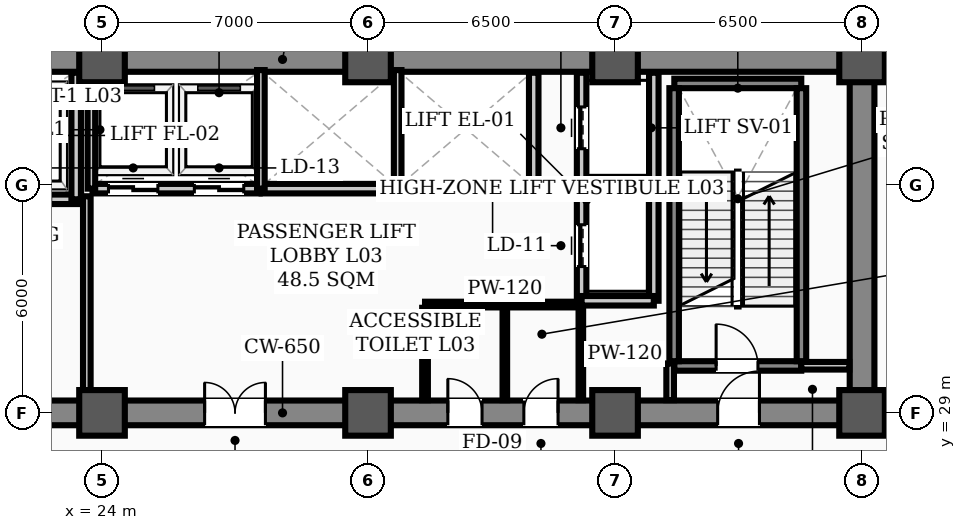
"""IFC4 building model, lengths in metres.
Left out: names, types, materials, properties, quantities, classifications, styles, units other than length and angle.
Written with IfcOpenShell. Run it as: python <this file> out.ifc"""

import sys

from ifc_helpers import new_model, si_unit, direction, frame, frame_2d, origin, origin_2d, place, context, subcontext, project, spatial, rectangle, hollow_rectangle, extrude, element, fill, save


model = new_model("IFC4")
c1 = context("Model", 3, precision=1e-05, world=origin(), true_north=direction((0.0, 1.0)))
c2 = subcontext(c1, "Body", "Model", "MODEL_VIEW")
j1 = project(units=[si_unit("LENGTHUNIT", "METRE"), si_unit("PLANEANGLEUNIT", "RADIAN")], contexts=[c1])
p1 = place(None, origin())
s1 = spatial("IfcSite", under=j1, at=p1, CompositionType="ELEMENT")
p2 = place(p1, origin())
s2 = spatial("IfcBuilding", under=s1, at=p2, CompositionType="ELEMENT")
p3 = place(p2, frame((0.0, 0.0, 11.2)))
s3 = spatial("IfcBuildingStorey", under=s2, at=p3, CompositionType="ELEMENT", Elevation=11.2)
for number, where, z_axis, x_axis in (
    (1, (24.0, 29.0, 0.0), (0.0, 0.0, 1.0), (1.0, 0.0, 0.0)),
    (2, (24.0, 38.3, 0.0), (0.0, 0.0, 1.0), (1.0, 0.0, 0.0)),
    (3, (31.0, 29.0, 0.0), (0.0, 0.0, 1.0), (1.0, 0.0, 0.0)),
    (4, (31.0, 38.3, 0.0), (0.0, 0.0, 1.0), (1.0, 0.0, 0.0)),
    (5, (37.5, 29.0, 0.0), (0.0, 0.0, 1.0), (1.0, 0.0, 0.0)),
    (6, (37.5, 38.3, 0.0), (0.0, 0.0, 1.0), (1.0, 0.0, 0.0)),
    (7, (44.0, 29.0, 0.0), (0.0, 0.0, 1.0), (1.0, 0.0, 0.0)),
    (8, (44.0, 38.3, 0.0), (0.0, 0.0, 1.0), (1.0, 0.0, 0.0)),
):
    element("IfcColumn", number, at=place(p3, frame(where, z_axis=z_axis, x_axis=x_axis)), inside=s3, PredefinedType="COLUMN", context=c2, shape_type="SweptSolid", body=[
        extrude(hollow_rectangle(XDim=1.2, YDim=1.2, WallThickness=0.04, InnerFilletRadius=0.02, OuterFilletRadius=0.06, at=origin_2d()), origin(), (0.0, 0.0, 1.0), 5.4),
    ])
p4 = place(p3, frame((13.5, 29.0, 0.0), z_axis=(0.0, 0.0, 1.0), x_axis=(1.0, 0.0, 0.0)))
e9 = element("IfcWall", 9, at=p4, inside=s3, PredefinedType="SHEAR", context=c2, shape_type="SweptSolid", body=[
    extrude(rectangle(XDim=30.5, YDim=0.65, at=frame_2d((15.25, 0.0))), origin(), (0.0, 0.0, 1.0), 5.15),
])
p5 = place(p4, frame((1.75, 0.0, 0.0)))
e10 = element("IfcOpeningElement", 10, at=p5, cuts=e9, PredefinedType="OPENING", context=c2, shape_type="SweptSolid", body=[
    extrude(rectangle(XDim=1.1, YDim=2.08, at=frame_2d((0.55, 1.04))), frame((0.0, 0.335, 0.0), z_axis=(0.0, -1.0, 0.0), x_axis=(1.0, 0.0, 0.0)), (0.0, 0.0, 1.0), 0.67),
])
p6 = place(p4, frame((26.7, 0.0, 0.0)))
e11 = element("IfcOpeningElement", 11, at=p6, cuts=e9, PredefinedType="OPENING", context=c2, shape_type="SweptSolid", body=[
    extrude(rectangle(XDim=1.1, YDim=2.08, at=frame_2d((0.55, 1.04))), frame((0.0, 0.335, 0.0), z_axis=(0.0, -1.0, 0.0), x_axis=(1.0, 0.0, 0.0)), (0.0, 0.0, 1.0), 0.67),
])
p7 = place(p4, frame((6.8, 0.0, 0.0)))
e12 = element("IfcOpeningElement", 12, at=p7, cuts=e9, PredefinedType="OPENING", context=c2, shape_type="SweptSolid", body=[
    extrude(rectangle(XDim=1.1, YDim=2.08, at=frame_2d((0.55, 1.04))), frame((0.0, 0.335, 0.0), z_axis=(0.0, -1.0, 0.0), x_axis=(1.0, 0.0, 0.0)), (0.0, 0.0, 1.0), 0.67),
])
p8 = place(p4, frame((13.2, 0.0, 0.0)))
e13 = element("IfcOpeningElement", 13, at=p8, cuts=e9, PredefinedType="OPENING", context=c2, shape_type="SweptSolid", body=[
    extrude(rectangle(XDim=1.6, YDim=2.08, at=frame_2d((0.8, 1.04))), frame((0.0, 0.335, 0.0), z_axis=(0.0, -1.0, 0.0), x_axis=(1.0, 0.0, 0.0)), (0.0, 0.0, 1.0), 0.67),
])
p9 = place(p4, frame((19.6, 0.0, 0.0)))
e14 = element("IfcOpeningElement", 14, at=p9, cuts=e9, PredefinedType="OPENING", context=c2, shape_type="SweptSolid", body=[
    extrude(rectangle(XDim=0.9, YDim=2.08, at=frame_2d((0.45, 1.04))), frame((0.0, 0.335, 0.0), z_axis=(0.0, -1.0, 0.0), x_axis=(1.0, 0.0, 0.0)), (0.0, 0.0, 1.0), 0.67),
])
p10 = place(p4, frame((21.6, 0.0, 0.0)))
e15 = element("IfcOpeningElement", 15, at=p10, cuts=e9, PredefinedType="OPENING", context=c2, shape_type="SweptSolid", body=[
    extrude(rectangle(XDim=0.9, YDim=2.08, at=frame_2d((0.45, 1.04))), frame((0.0, 0.335, 0.0), z_axis=(0.0, -1.0, 0.0), x_axis=(1.0, 0.0, 0.0)), (0.0, 0.0, 1.0), 0.67),
])
p11 = place(p3, frame((13.5, 38.3, 0.0), z_axis=(0.0, 0.0, 1.0), x_axis=(1.0, 0.0, 0.0)))
e16 = element("IfcWall", 16, at=p11, inside=s3, PredefinedType="SHEAR", context=c2, shape_type="SweptSolid", body=[
    extrude(rectangle(XDim=30.5, YDim=0.65, at=frame_2d((15.25, 0.0))), origin(), (0.0, 0.0, 1.0), 5.15),
])
p12 = place(p3, frame((44.0, 29.35, 0.0), z_axis=(0.0, 0.0, 1.0), x_axis=(0.0, 1.0, 0.0)))
e17 = element("IfcWall", 17, at=p12, inside=s3, PredefinedType="SHEAR", context=c2, shape_type="SweptSolid", body=[
    extrude(rectangle(XDim=8.6, YDim=0.65, at=frame_2d((4.3, 0.0))), origin(), (0.0, 0.0, 1.0), 5.15),
])
p13 = place(p3, frame((39.06, 30.235, 0.0), z_axis=(0.0, 0.0, 1.0), x_axis=(1.0, 0.0, 0.0)))
e18 = element("IfcWall", 18, at=p13, inside=s3, PredefinedType="STANDARD", context=c2, shape_type="SweptSolid", body=[
    extrude(rectangle(XDim=3.34, YDim=0.25, at=frame_2d((1.67, 0.0))), origin(), (0.0, 0.0, 1.0), 5.15),
])
p14 = place(p13, frame((1.1, 0.0, 0.0)))
e19 = element("IfcOpeningElement", 19, at=p14, cuts=e18, PredefinedType="OPENING", context=c2, shape_type="SweptSolid", body=[
    extrude(rectangle(XDim=1.1, YDim=2.08, at=frame_2d((0.55, 1.04))), frame((0.0, 0.135, 0.0), z_axis=(0.0, -1.0, 0.0), x_axis=(1.0, 0.0, 0.0)), (0.0, 0.0, 1.0), 0.27),
])
p15 = place(p3, frame((39.06, 37.669, 0.0), z_axis=(0.0, 0.0, 1.0), x_axis=(1.0, 0.0, 0.0)))
e20 = element("IfcWall", 20, at=p15, inside=s3, PredefinedType="STANDARD", context=c2, shape_type="SweptSolid", body=[
    extrude(rectangle(XDim=3.34, YDim=0.25, at=frame_2d((1.67, 0.0))), origin(), (0.0, 0.0, 1.0), 5.15),
])
for number, where, z_axis, x_axis in (
    (21, (39.055, 30.36, 0.0), (0.0, 0.0, 1.0), (0.0, 1.0, 0.0)),
    (22, (42.405, 30.36, 0.0), (0.0, 0.0, 1.0), (0.0, 1.0, 0.0)),
):
    element("IfcWall", number, at=place(p3, frame(where, z_axis=z_axis, x_axis=x_axis)), inside=s3, PredefinedType="STANDARD", context=c2, shape_type="SweptSolid", body=[
        extrude(rectangle(XDim=7.184, YDim=0.25, at=frame_2d((3.592, 0.0))), origin(), (0.0, 0.0, 1.0), 5.15),
    ])
p16 = place(p3, frame((18.1, 34.62, 0.0), z_axis=(0.0, 0.0, 1.0), x_axis=(1.0, 0.0, 0.0)))
e23 = element("IfcWall", 23, at=p16, inside=s3, PredefinedType="STANDARD", context=c2, shape_type="SweptSolid", body=[
    extrude(rectangle(XDim=5.35, YDim=0.25, at=frame_2d((2.675, 0.0))), origin(), (0.0, 0.0, 1.0), 5.15),
])
p17 = place(p16, frame((0.85, 0.0, 0.0)))
e24 = element("IfcOpeningElement", 24, at=p17, cuts=e23, PredefinedType="OPENING", context=c2, shape_type="SweptSolid", body=[
    extrude(rectangle(XDim=1.1, YDim=2.08, at=frame_2d((0.55, 1.04))), frame((0.0, 0.135, 0.0), z_axis=(0.0, -1.0, 0.0), x_axis=(1.0, 0.0, 0.0)), (0.0, 0.0, 1.0), 0.27),
])
p18 = place(p16, frame((3.45, 0.0, 0.0)))
e25 = element("IfcOpeningElement", 25, at=p18, cuts=e23, PredefinedType="OPENING", context=c2, shape_type="SweptSolid", body=[
    extrude(rectangle(XDim=1.1, YDim=2.08, at=frame_2d((0.55, 1.04))), frame((0.0, 0.135, 0.0), z_axis=(0.0, -1.0, 0.0), x_axis=(1.0, 0.0, 0.0)), (0.0, 0.0, 1.0), 0.27),
])
p19 = place(p3, frame((36.62, 31.95, 0.0), z_axis=(0.0, 0.0, 1.0), x_axis=(0.0, 1.0, 0.0)))
e26 = element("IfcWall", 26, at=p19, inside=s3, PredefinedType="STANDARD", context=c2, shape_type="SweptSolid", body=[
    extrude(rectangle(XDim=6.0, YDim=0.25, at=frame_2d((3.0, 0.0))), origin(), (0.0, 0.0, 1.0), 4.33),
])
p20 = place(p19, frame((0.9, 0.0, 0.0)))
e27 = element("IfcOpeningElement", 27, at=p20, cuts=e26, PredefinedType="OPENING", context=c2, shape_type="SweptSolid", body=[
    extrude(rectangle(XDim=1.1, YDim=2.08, at=frame_2d((0.55, 1.04))), frame((0.0, 0.135, 0.0), z_axis=(0.0, -1.0, 0.0), x_axis=(1.0, 0.0, 0.0)), (0.0, 0.0, 1.0), 0.27),
])
p21 = place(p19, frame((4.0, 0.0, 0.0)))
e28 = element("IfcOpeningElement", 28, at=p21, cuts=e26, PredefinedType="OPENING", context=c2, shape_type="SweptSolid", body=[
    extrude(rectangle(XDim=1.1, YDim=2.08, at=frame_2d((0.55, 1.04))), frame((0.0, 0.135, 0.0), z_axis=(0.0, -1.0, 0.0), x_axis=(1.0, 0.0, 0.0)), (0.0, 0.0, 1.0), 0.27),
])
p22 = place(p3, frame((38.52, 31.95, 0.0), z_axis=(0.0, 0.0, 1.0), x_axis=(0.0, 1.0, 0.0)))
e29 = element("IfcWall", 29, at=p22, inside=s3, PredefinedType="STANDARD", context=c2, shape_type="SweptSolid", body=[
    extrude(rectangle(XDim=6.0, YDim=0.25, at=frame_2d((3.0, 0.0))), origin(), (0.0, 0.0, 1.0), 4.33),
])
p23 = place(p3, frame((36.62, 31.95, 0.0), z_axis=(0.0, 0.0, 1.0), x_axis=(1.0, 0.0, 0.0)))
e30 = element("IfcWall", 30, at=p23, inside=s3, PredefinedType="STANDARD", context=c2, shape_type="SweptSolid", body=[
    extrude(rectangle(XDim=1.9, YDim=0.25, at=frame_2d((0.95, 0.0))), origin(), (0.0, 0.0, 1.0), 4.98),
])
p24 = place(p3, frame((23.32, 34.62, 0.0), z_axis=(0.0, 0.0, 1.0), x_axis=(0.0, 1.0, 0.0)))
e31 = element("IfcWall", 31, at=p24, inside=s3, PredefinedType="STANDARD", context=c2, shape_type="SweptSolid", body=[
    extrude(rectangle(XDim=3.33, YDim=0.25, at=frame_2d((1.665, 0.0))), origin(), (0.0, 0.0, 1.0), 4.33),
])
p25 = place(p3, frame((35.36, 34.9, 0.0), z_axis=(0.0, 0.0, 1.0), x_axis=(0.0, 1.0, 0.0)))
e32 = element("IfcWall", 32, at=p25, inside=s3, PredefinedType="STANDARD", context=c2, shape_type="SweptSolid", body=[
    extrude(rectangle(XDim=3.05, YDim=0.25, at=frame_2d((1.525, 0.0))), origin(), (0.0, 0.0, 1.0), 4.33),
])
p26 = place(p3, frame((23.75, 34.9, 0.0), z_axis=(0.0, 0.0, 1.0), x_axis=(1.0, 0.0, 0.0)))
e33 = element("IfcWall", 33, at=p26, inside=s3, PredefinedType="STANDARD", context=c2, shape_type="SweptSolid", body=[
    extrude(rectangle(XDim=4.4, YDim=0.25, at=frame_2d((2.2, 0.0))), origin(), (0.0, 0.0, 1.0), 5.15),
])
p27 = place(p26, frame((0.42, 0.0, 0.0)))
e34 = element("IfcOpeningElement", 34, at=p27, cuts=e33, PredefinedType="OPENING", context=c2, shape_type="SweptSolid", body=[
    extrude(rectangle(XDim=1.3, YDim=2.08, at=frame_2d((0.65, 1.04))), frame((0.0, 0.135, 0.0), z_axis=(0.0, -1.0, 0.0), x_axis=(1.0, 0.0, 0.0)), (0.0, 0.0, 1.0), 0.27),
])
p28 = place(p26, frame((2.68, 0.0, 0.0)))
e35 = element("IfcOpeningElement", 35, at=p28, cuts=e33, PredefinedType="OPENING", context=c2, shape_type="SweptSolid", body=[
    extrude(rectangle(XDim=1.3, YDim=2.08, at=frame_2d((0.65, 1.04))), frame((0.0, 0.135, 0.0), z_axis=(0.0, -1.0, 0.0), x_axis=(1.0, 0.0, 0.0)), (0.0, 0.0, 1.0), 0.27),
])
p29 = place(p3, frame((28.2, 34.9, 0.0), z_axis=(0.0, 0.0, 1.0), x_axis=(1.0, 0.0, 0.0)))
e36 = element("IfcWall", 36, at=p29, inside=s3, PredefinedType="STANDARD", context=c2, shape_type="SweptSolid", body=[
    extrude(rectangle(XDim=3.55, YDim=0.25, at=frame_2d((1.775, 0.0))), origin(), (0.0, 0.0, 1.0), 5.15),
])
p30 = place(p3, frame((31.8, 34.9, 0.0), z_axis=(0.0, 0.0, 1.0), x_axis=(1.0, 0.0, 0.0)))
e37 = element("IfcWall", 37, at=p30, inside=s3, PredefinedType="STANDARD", context=c2, shape_type="SweptSolid", body=[
    extrude(rectangle(XDim=3.6, YDim=0.25, at=frame_2d((1.8, 0.0))), origin(), (0.0, 0.0, 1.0), 5.15),
])
p31 = place(p3, frame((42.4, 30.24, 0.0), z_axis=(0.0, 0.0, 1.0), x_axis=(1.0, 0.0, 0.0)))
e38 = element("IfcWall", 38, at=p31, inside=s3, PredefinedType="STANDARD", context=c2, shape_type="SweptSolid", body=[
    extrude(rectangle(XDim=1.265, YDim=0.2, at=frame_2d((0.633, 0.0))), origin(), (0.0, 0.0, 1.0), 4.43),
])
p32 = place(p3, frame((32.5, 31.85, 0.0), z_axis=(0.0, 0.0, 1.0), x_axis=(1.0, 0.0, 0.0)))
e39 = element("IfcWall", 39, at=p32, inside=s3, PredefinedType="PARTITIONING", context=c2, shape_type="SweptSolid", body=[
    extrude(rectangle(XDim=4.1, YDim=0.15, at=frame_2d((2.05, 0.0))), origin(), (0.0, 0.0, 1.0), 5.15),
])
p33 = place(p3, frame((38.95, 29.335, 0.0), z_axis=(0.0, 0.0, 1.0), x_axis=(0.0, 1.0, 0.0)))
e40 = element("IfcWall", 40, at=p33, inside=s3, PredefinedType="STANDARD", context=c2, shape_type="SweptSolid", body=[
    extrude(rectangle(XDim=0.965, YDim=0.2, at=frame_2d((0.482, 0.0))), origin(), (0.0, 0.0, 1.0), 4.33),
])
p34 = place(p3, frame((23.6, 29.335, 0.0), z_axis=(0.0, 0.0, 1.0), x_axis=(0.0, 1.0, 0.0)))
e41 = element("IfcWall", 41, at=p34, inside=s3, PredefinedType="STANDARD", context=c2, shape_type="SweptSolid", body=[
    extrude(rectangle(XDim=5.365, YDim=0.2, at=frame_2d((2.683, 0.0))), origin(), (0.0, 0.0, 1.0), 4.33),
])
p35 = place(p3, frame((32.5, 29.335, 0.0), z_axis=(0.0, 0.0, 1.0), x_axis=(0.0, 1.0, 0.0)))
e42 = element("IfcWall", 42, at=p35, inside=s3, PredefinedType="PARTITIONING", context=c2, shape_type="SweptSolid", body=[
    extrude(rectangle(XDim=2.43, YDim=0.15, at=frame_2d((1.215, 0.0))), origin(), (0.0, 0.0, 1.0), 4.33),
])
for number, where, z_axis, x_axis in (
    (43, (36.6, 29.335, 0.0), (0.0, 0.0, 1.0), (0.0, 1.0, 0.0)),
    (44, (34.6, 29.335, 0.0), (0.0, 0.0, 1.0), (0.0, 1.0, 0.0)),
):
    element("IfcWall", number, at=place(p3, frame(where, z_axis=z_axis, x_axis=x_axis)), inside=s3, PredefinedType="PARTITIONING", context=c2, shape_type="SweptSolid", body=[
        extrude(rectangle(XDim=2.43, YDim=0.12, at=frame_2d((1.215, 0.0))), origin(), (0.0, 0.0, 1.0), 4.33),
    ])
for number, where, z_axis, x_axis in (
    (45, (23.72, 34.9, 0.0), (0.0, 0.0, 1.0), (0.0, 1.0, 0.0)),
    (46, (28.18, 34.9, 0.0), (0.0, 0.0, 1.0), (0.0, 1.0, 0.0)),
    (47, (31.78, 34.9, 0.0), (0.0, 0.0, 1.0), (0.0, 1.0, 0.0)),
):
    element("IfcWall", number, at=place(p3, frame(where, z_axis=z_axis, x_axis=x_axis)), inside=s3, PredefinedType="STANDARD", context=c2, shape_type="SweptSolid", body=[
        extrude(rectangle(XDim=3.12, YDim=0.2, at=frame_2d((1.56, 0.0))), origin(), (0.0, 0.0, 1.0), 4.33),
    ])
p36 = place(p14, origin())
e48 = element("IfcDoor", 48, at=p36, inside=s3, OperationType="SINGLE_SWING_LEFT", PredefinedType="DOOR", context=c2, shape_type="SweptSolid", body=[
    extrude(rectangle(XDim=1.1, YDim=2.08, at=frame_2d((0.55, 1.04))), frame((0.0, 0.025, 0.0), z_axis=(0.0, -1.0, 0.0), x_axis=(1.0, 0.0, 0.0)), (0.0, 0.0, 1.0), 0.05),
])
fill(e19, e48)
p37 = place(p6, origin())
e49 = element("IfcDoor", 49, at=p37, inside=s3, OperationType="SINGLE_SWING_RIGHT", PredefinedType="DOOR", context=c2, shape_type="SweptSolid", body=[
    extrude(rectangle(XDim=1.1, YDim=2.08, at=frame_2d((0.55, 1.04))), frame((0.0, 0.025, 0.0), z_axis=(0.0, -1.0, 0.0), x_axis=(1.0, 0.0, 0.0)), (0.0, 0.0, 1.0), 0.05),
])
fill(e11, e49)
p38 = place(p8, origin())
e50 = element("IfcDoor", 50, at=p38, inside=s3, OperationType="DOUBLE_DOOR_SINGLE_SWING", PredefinedType="DOOR", context=c2, shape_type="SweptSolid", body=[
    extrude(rectangle(XDim=1.6, YDim=2.08, at=frame_2d((0.8, 1.04))), frame((0.0, 0.025, 0.0), z_axis=(0.0, -1.0, 0.0), x_axis=(1.0, 0.0, 0.0)), (0.0, 0.0, 1.0), 0.05),
])
fill(e13, e50)
p39 = place(p9, origin())
e51 = element("IfcDoor", 51, at=p39, inside=s3, OperationType="SINGLE_SWING_LEFT", PredefinedType="DOOR", context=c2, shape_type="SweptSolid", body=[
    extrude(rectangle(XDim=0.9, YDim=2.08, at=frame_2d((0.45, 1.04))), frame((0.0, 0.025, 0.0), z_axis=(0.0, -1.0, 0.0), x_axis=(1.0, 0.0, 0.0)), (0.0, 0.0, 1.0), 0.05),
])
fill(e14, e51)
p40 = place(p10, origin())
e52 = element("IfcDoor", 52, at=p40, inside=s3, OperationType="SINGLE_SWING_RIGHT", PredefinedType="DOOR", context=c2, shape_type="SweptSolid", body=[
    extrude(rectangle(XDim=0.9, YDim=2.08, at=frame_2d((0.45, 1.04))), frame((0.0, 0.025, 0.0), z_axis=(0.0, -1.0, 0.0), x_axis=(1.0, 0.0, 0.0)), (0.0, 0.0, 1.0), 0.05),
])
fill(e15, e52)
p41 = place(p20, origin())
e53 = element("IfcDoor", 53, at=p41, inside=s3, OperationType="SLIDING_TO_LEFT", PredefinedType="DOOR", context=c2, shape_type="SweptSolid", body=[
    extrude(rectangle(XDim=1.1, YDim=2.08, at=frame_2d((0.55, 1.04))), frame((0.0, 0.025, 0.0), z_axis=(0.0, -1.0, 0.0), x_axis=(1.0, 0.0, 0.0)), (0.0, 0.0, 1.0), 0.05),
])
fill(e27, e53)
p42 = place(p21, origin())
e54 = element("IfcDoor", 54, at=p42, inside=s3, OperationType="SLIDING_TO_LEFT", PredefinedType="DOOR", context=c2, shape_type="SweptSolid", body=[
    extrude(rectangle(XDim=1.1, YDim=2.08, at=frame_2d((0.55, 1.04))), frame((0.0, 0.025, 0.0), z_axis=(0.0, -1.0, 0.0), x_axis=(1.0, 0.0, 0.0)), (0.0, 0.0, 1.0), 0.05),
])
fill(e28, e54)
p43 = place(p27, origin())
e55 = element("IfcDoor", 55, at=p43, inside=s3, OperationType="DOUBLE_DOOR_SLIDING", PredefinedType="DOOR", context=c2, shape_type="SweptSolid", body=[
    extrude(rectangle(XDim=1.3, YDim=2.08, at=frame_2d((0.65, 1.04))), frame((0.0, 0.025, 0.0), z_axis=(0.0, -1.0, 0.0), x_axis=(1.0, 0.0, 0.0)), (0.0, 0.0, 1.0), 0.05),
])
fill(e34, e55)
p44 = place(p28, origin())
e56 = element("IfcDoor", 56, at=p44, inside=s3, OperationType="DOUBLE_DOOR_SLIDING", PredefinedType="DOOR", context=c2, shape_type="SweptSolid", body=[
    extrude(rectangle(XDim=1.3, YDim=2.08, at=frame_2d((0.65, 1.04))), frame((0.0, 0.025, 0.0), z_axis=(0.0, -1.0, 0.0), x_axis=(1.0, 0.0, 0.0)), (0.0, 0.0, 1.0), 0.05),
])
fill(e35, e56)
save(model, sys.argv[1])
